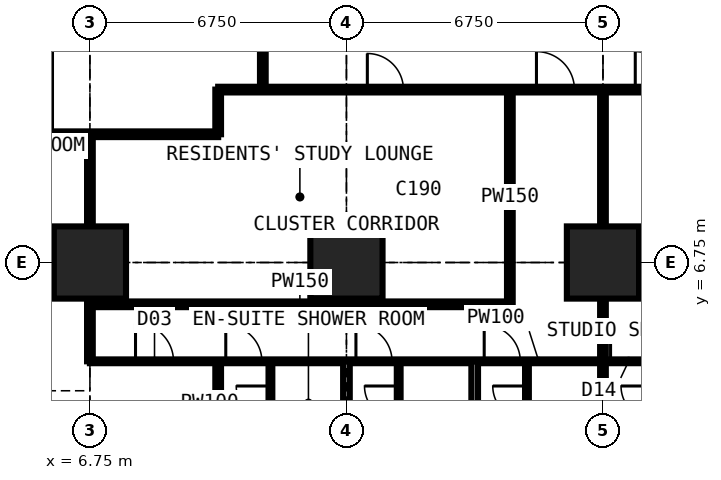
"""IFC4 building model, lengths in metres.
Left out: names, types, materials, properties, quantities, classifications, styles, units other than length and angle.
Written with IfcOpenShell. Run it as: python <this file> out.ifc"""

import sys

from ifc_helpers import new_model, si_unit, direction, frame, frame_2d, origin, origin_2d, place, context, subcontext, project, spatial, rectangle, extrude, element, fill, save


model = new_model("IFC4")
c1 = context("Model", 3, precision=1e-05, world=origin(), true_north=direction((0.0, 1.0)))
c2 = subcontext(c1, "Body", "Model", "MODEL_VIEW")
j1 = project(units=[si_unit("LENGTHUNIT", "METRE"), si_unit("PLANEANGLEUNIT", "RADIAN")], contexts=[c1])
p1 = place(None, origin())
s1 = spatial("IfcSite", under=j1, at=p1, CompositionType="ELEMENT")
p2 = place(p1, origin())
s2 = spatial("IfcBuilding", under=s1, at=p2, CompositionType="ELEMENT")
p3 = place(p2, frame((0.0, 0.0, 39.6)))
s3 = spatial("IfcBuildingStorey", under=s2, at=p3, CompositionType="ELEMENT", Elevation=39.6)
for number, where, z_axis, x_axis in (
    (1, (6.75, 6.75, 0.0), (0.0, 0.0, 1.0), (1.0, 0.0, 0.0)),
    (2, (13.5, 6.75, 0.0), (0.0, 0.0, 1.0), (1.0, 0.0, 0.0)),
    (3, (20.25, 6.75, 0.0), (0.0, 0.0, 1.0), (1.0, 0.0, 0.0)),
):
    element("IfcColumn", number, at=place(p3, frame(where, z_axis=z_axis, x_axis=x_axis)), inside=s3, PredefinedType="COLUMN", context=c2, shape_type="SweptSolid", body=[
        extrude(rectangle(XDim=1.9, YDim=1.9, at=origin_2d()), origin(), (0.0, 0.0, 1.0), 3.6),
    ])
p4 = place(p3, frame((-0.734, 10.125, 0.0), z_axis=(0.0, 0.0, 1.0), x_axis=(1.0, 0.0, 0.0)))
e4 = element("IfcWall", 4, at=p4, inside=s3, PredefinedType="PARTITIONING", context=c2, shape_type="SweptSolid", body=[
    extrude(rectangle(XDim=10.859, YDim=0.15, at=frame_2d((5.429, 0.0))), origin(), (0.0, 0.0, 1.0), 3.375),
])
p5 = place(p3, frame((6.75, 4.15, 0.0), z_axis=(0.0, 0.0, 1.0), x_axis=(0.0, 1.0, 0.0)))
e5 = element("IfcWall", 5, at=p5, inside=s3, PredefinedType="PARTITIONING", context=c2, shape_type="SweptSolid", body=[
    extrude(rectangle(XDim=5.975, YDim=0.15, at=frame_2d((2.988, 0.0))), origin(), (0.0, 0.0, 1.0), 2.877),
])
p6 = place(p3, frame((6.75, 4.15, 0.0), z_axis=(0.0, 0.0, 1.0), x_axis=(1.0, 0.0, 0.0)))
e6 = element("IfcWall", 6, at=p6, inside=s3, PredefinedType="PARTITIONING", context=c2, shape_type="SweptSolid", body=[
    extrude(rectangle(XDim=23.625, YDim=0.1, at=frame_2d((11.812, 0.0))), origin(), (0.0, 0.0, 1.0), 3.375),
])
p7 = place(p6, frame((1.2, 0.0, 0.0)))
e7 = element("IfcOpeningElement", 7, at=p7, cuts=e6, PredefinedType="OPENING", context=c2, shape_type="SweptSolid", body=[
    extrude(rectangle(XDim=1.0, YDim=2.2, at=frame_2d((0.5, 1.1))), frame((0.0, 0.06, 0.0), z_axis=(0.0, -1.0, 0.0), x_axis=(1.0, 0.0, 0.0)), (0.0, 0.0, 1.0), 0.12),
])
p8 = place(p6, frame((3.575, 0.0, 0.0)))
e8 = element("IfcOpeningElement", 8, at=p8, cuts=e6, PredefinedType="OPENING", context=c2, shape_type="SweptSolid", body=[
    extrude(rectangle(XDim=0.95, YDim=2.2, at=frame_2d((0.475, 1.1))), frame((0.0, 0.06, 0.0), z_axis=(0.0, -1.0, 0.0), x_axis=(1.0, 0.0, 0.0)), (0.0, 0.0, 1.0), 0.12),
])
p9 = place(p6, frame((7.0, 0.0, 0.0)))
e9 = element("IfcOpeningElement", 9, at=p9, cuts=e6, PredefinedType="OPENING", context=c2, shape_type="SweptSolid", body=[
    extrude(rectangle(XDim=0.95, YDim=2.2, at=frame_2d((0.475, 1.1))), frame((0.0, 0.06, 0.0), z_axis=(0.0, -1.0, 0.0), x_axis=(1.0, 0.0, 0.0)), (0.0, 0.0, 1.0), 0.12),
])
p10 = place(p6, frame((10.375, 0.0, 0.0)))
e10 = element("IfcOpeningElement", 10, at=p10, cuts=e6, PredefinedType="OPENING", context=c2, shape_type="SweptSolid", body=[
    extrude(rectangle(XDim=0.95, YDim=2.2, at=frame_2d((0.475, 1.1))), frame((0.0, 0.06, 0.0), z_axis=(0.0, -1.0, 0.0), x_axis=(1.0, 0.0, 0.0)), (0.0, 0.0, 1.0), 0.12),
])
p11 = place(p6, frame((13.7, 0.0, 0.0)))
e11 = element("IfcOpeningElement", 11, at=p11, cuts=e6, PredefinedType="OPENING", context=c2, shape_type="SweptSolid", body=[
    extrude(rectangle(XDim=0.95, YDim=2.2, at=frame_2d((0.475, 1.1))), frame((0.0, 0.06, 0.0), z_axis=(0.0, -1.0, 0.0), x_axis=(1.0, 0.0, 0.0)), (0.0, 0.0, 1.0), 0.12),
])
p12 = place(p6, frame((17.125, 0.0, 0.0)))
e12 = element("IfcOpeningElement", 12, at=p12, cuts=e6, PredefinedType="OPENING", context=c2, shape_type="SweptSolid", body=[
    extrude(rectangle(XDim=0.95, YDim=2.2, at=frame_2d((0.475, 1.1))), frame((0.0, 0.06, 0.0), z_axis=(0.0, -1.0, 0.0), x_axis=(1.0, 0.0, 0.0)), (0.0, 0.0, 1.0), 0.12),
])
p13 = place(p6, frame((20.5, 0.0, 0.0)))
e13 = element("IfcOpeningElement", 13, at=p13, cuts=e6, PredefinedType="OPENING", context=c2, shape_type="SweptSolid", body=[
    extrude(rectangle(XDim=0.95, YDim=2.2, at=frame_2d((0.475, 1.1))), frame((0.0, 0.06, 0.0), z_axis=(0.0, -1.0, 0.0), x_axis=(1.0, 0.0, 0.0)), (0.0, 0.0, 1.0), 0.12),
])
p14 = place(p3, frame((6.75, 5.65, 0.0), z_axis=(0.0, 0.0, 1.0), x_axis=(1.0, 0.0, 0.0)))
e14 = element("IfcWall", 14, at=p14, inside=s3, PredefinedType="PARTITIONING", context=c2, shape_type="SweptSolid", body=[
    extrude(rectangle(XDim=11.05, YDim=0.15, at=frame_2d((5.525, 0.0))), origin(), (0.0, 0.0, 1.0), 3.375),
])
p15 = place(p3, frame((10.125, -0.734, 0.0), z_axis=(0.0, 0.0, 1.0), x_axis=(0.0, 1.0, 0.0)))
e15 = element("IfcWall", 15, at=p15, inside=s3, PredefinedType="PARTITIONING", context=c2, shape_type="SweptSolid", body=[
    extrude(rectangle(XDim=4.884, YDim=0.15, at=frame_2d((2.442, 0.0))), origin(), (0.0, 0.0, 1.0), 3.375),
])
p16 = place(p3, frame((10.125, 10.125, 0.0), z_axis=(0.0, 0.0, 1.0), x_axis=(0.0, 1.0, 0.0)))
e16 = element("IfcWall", 16, at=p16, inside=s3, PredefinedType="PARTITIONING", context=c2, shape_type="SweptSolid", body=[
    extrude(rectangle(XDim=1.175, YDim=0.15, at=frame_2d((0.587, 0.0))), origin(), (0.0, 0.0, 1.0), 3.375),
])
p17 = place(p3, frame((10.125, 11.3, 0.0), z_axis=(0.0, 0.0, 1.0), x_axis=(1.0, 0.0, 0.0)))
e17 = element("IfcWall", 17, at=p17, inside=s3, PredefinedType="PARTITIONING", context=c2, shape_type="SweptSolid", body=[
    extrude(rectangle(XDim=20.675, YDim=0.15, at=frame_2d((10.337, 0.0))), origin(), (0.0, 0.0, 1.0), 3.375),
])
p18 = place(p17, frame((8.375, 0.0, 0.0)))
e18 = element("IfcOpeningElement", 18, at=p18, cuts=e17, PredefinedType="OPENING", context=c2, shape_type="SweptSolid", body=[
    extrude(rectangle(XDim=1.0, YDim=2.2, at=frame_2d((0.5, 1.1))), frame((0.0, 0.085, 0.0), z_axis=(0.0, -1.0, 0.0), x_axis=(1.0, 0.0, 0.0)), (0.0, 0.0, 1.0), 0.17),
])
p19 = place(p17, frame((10.975, 0.0, 0.0)))
e19 = element("IfcOpeningElement", 19, at=p19, cuts=e17, PredefinedType="OPENING", context=c2, shape_type="SweptSolid", body=[
    extrude(rectangle(XDim=1.0, YDim=2.2, at=frame_2d((0.5, 1.1))), frame((0.0, 0.085, 0.0), z_axis=(0.0, -1.0, 0.0), x_axis=(1.0, 0.0, 0.0)), (0.0, 0.0, 1.0), 0.17),
])
p20 = place(p17, frame((3.925, 0.0, 0.0)))
e20 = element("IfcOpeningElement", 20, at=p20, cuts=e17, PredefinedType="OPENING", context=c2, shape_type="SweptSolid", body=[
    extrude(rectangle(XDim=0.95, YDim=2.2, at=frame_2d((0.475, 1.1))), frame((0.0, 0.085, 0.0), z_axis=(0.0, -1.0, 0.0), x_axis=(1.0, 0.0, 0.0)), (0.0, 0.0, 1.0), 0.17),
])
p21 = place(p3, frame((11.3, 11.3, 0.0), z_axis=(0.0, 0.0, 1.0), x_axis=(0.0, 1.0, 0.0)))
e21 = element("IfcWall", 21, at=p21, inside=s3, PredefinedType="PARTITIONING", context=c2, shape_type="SweptSolid", body=[
    extrude(rectangle(XDim=19.075, YDim=0.15, at=frame_2d((9.538, 0.0))), origin(), (0.0, 0.0, 1.0), 3.375),
])
p22 = place(p21, frame((10.137, 0.0, 0.0)))
e22 = element("IfcOpeningElement", 22, at=p22, cuts=e21, PredefinedType="OPENING", context=c2, shape_type="SweptSolid", body=[
    extrude(rectangle(XDim=1.0, YDim=2.2, at=frame_2d((0.5, 1.1))), frame((0.0, 0.085, 0.0), z_axis=(0.0, -1.0, 0.0), x_axis=(1.0, 0.0, 0.0)), (0.0, 0.0, 1.0), 0.17),
])
p23 = place(p3, frame((11.5, 1.95, 0.0), z_axis=(0.0, 0.0, 1.0), x_axis=(0.0, 1.0, 0.0)))
e23 = element("IfcWall", 23, at=p23, inside=s3, PredefinedType="PARTITIONING", context=c2, shape_type="SweptSolid", body=[
    extrude(rectangle(XDim=2.2, YDim=0.1, at=frame_2d((1.1, 0.0))), origin(), (0.0, 0.0, 1.0), 3.375),
])
p24 = place(p23, frame((0.65, 0.0, 0.0)))
e24 = element("IfcOpeningElement", 24, at=p24, cuts=e23, PredefinedType="OPENING", context=c2, shape_type="SweptSolid", body=[
    extrude(rectangle(XDim=0.9, YDim=2.2, at=frame_2d((0.45, 1.1))), frame((0.0, 0.06, 0.0), z_axis=(0.0, -1.0, 0.0), x_axis=(1.0, 0.0, 0.0)), (0.0, 0.0, 1.0), 0.12),
])
p25 = place(p3, frame((13.5, -0.734, 0.0), z_axis=(0.0, 0.0, 1.0), x_axis=(0.0, 1.0, 0.0)))
e25 = element("IfcWall", 25, at=p25, inside=s3, PredefinedType="PARTITIONING", context=c2, shape_type="SweptSolid", body=[
    extrude(rectangle(XDim=4.884, YDim=0.175, at=frame_2d((2.442, 0.0))), origin(), (0.0, 0.0, 1.0), 2.877),
])
p26 = place(p3, frame((14.875, 1.95, 0.0), z_axis=(0.0, 0.0, 1.0), x_axis=(0.0, 1.0, 0.0)))
e26 = element("IfcWall", 26, at=p26, inside=s3, PredefinedType="PARTITIONING", context=c2, shape_type="SweptSolid", body=[
    extrude(rectangle(XDim=2.2, YDim=0.1, at=frame_2d((1.1, 0.0))), origin(), (0.0, 0.0, 1.0), 3.375),
])
p27 = place(p26, frame((0.65, 0.0, 0.0)))
e27 = element("IfcOpeningElement", 27, at=p27, cuts=e26, PredefinedType="OPENING", context=c2, shape_type="SweptSolid", body=[
    extrude(rectangle(XDim=0.9, YDim=2.2, at=frame_2d((0.45, 1.1))), frame((0.0, 0.06, 0.0), z_axis=(0.0, -1.0, 0.0), x_axis=(1.0, 0.0, 0.0)), (0.0, 0.0, 1.0), 0.12),
])
p28 = place(p3, frame((16.875, -0.734, 0.0), z_axis=(0.0, 0.0, 1.0), x_axis=(0.0, 1.0, 0.0)))
e28 = element("IfcWall", 28, at=p28, inside=s3, PredefinedType="PARTITIONING", context=c2, shape_type="SweptSolid", body=[
    extrude(rectangle(XDim=4.884, YDim=0.175, at=frame_2d((2.442, 0.0))), origin(), (0.0, 0.0, 1.0), 3.375),
])
p29 = place(p3, frame((17.8, 5.65, 0.0), z_axis=(0.0, 0.0, 1.0), x_axis=(0.0, 1.0, 0.0)))
e29 = element("IfcWall", 29, at=p29, inside=s3, PredefinedType="PARTITIONING", context=c2, shape_type="SweptSolid", body=[
    extrude(rectangle(XDim=5.65, YDim=0.15, at=frame_2d((2.825, 0.0))), origin(), (0.0, 0.0, 1.0), 3.375),
])
p30 = place(p3, frame((18.25, 1.95, 0.0), z_axis=(0.0, 0.0, 1.0), x_axis=(0.0, 1.0, 0.0)))
e30 = element("IfcWall", 30, at=p30, inside=s3, PredefinedType="PARTITIONING", context=c2, shape_type="SweptSolid", body=[
    extrude(rectangle(XDim=2.2, YDim=0.1, at=frame_2d((1.1, 0.0))), origin(), (0.0, 0.0, 1.0), 3.375),
])
p31 = place(p30, frame((0.65, 0.0, 0.0)))
e31 = element("IfcOpeningElement", 31, at=p31, cuts=e30, PredefinedType="OPENING", context=c2, shape_type="SweptSolid", body=[
    extrude(rectangle(XDim=0.9, YDim=2.2, at=frame_2d((0.45, 1.1))), frame((0.0, 0.06, 0.0), z_axis=(0.0, -1.0, 0.0), x_axis=(1.0, 0.0, 0.0)), (0.0, 0.0, 1.0), 0.12),
])
p32 = place(p3, frame((20.25, -0.734, 0.0), z_axis=(0.0, 0.0, 1.0), x_axis=(0.0, 1.0, 0.0)))
e32 = element("IfcWall", 32, at=p32, inside=s3, PredefinedType="PARTITIONING", context=c2, shape_type="SweptSolid", body=[
    extrude(rectangle(XDim=12.034, YDim=0.15, at=frame_2d((6.017, 0.0))), origin(), (0.0, 0.0, 1.0), 2.61),
])
p33 = place(p7, origin())
e33 = element("IfcDoor", 33, at=p33, inside=s3, OperationType="SINGLE_SWING_LEFT", PredefinedType="DOOR", context=c2, shape_type="SweptSolid", body=[
    extrude(rectangle(XDim=1.0, YDim=2.2, at=frame_2d((0.5, 1.1))), frame((0.0, 0.025, 0.0), z_axis=(0.0, -1.0, 0.0), x_axis=(1.0, 0.0, 0.0)), (0.0, 0.0, 1.0), 0.05),
])
fill(e7, e33)
p34 = place(p8, origin())
e34 = element("IfcDoor", 34, at=p34, inside=s3, OperationType="SINGLE_SWING_LEFT", PredefinedType="DOOR", context=c2, shape_type="SweptSolid", body=[
    extrude(rectangle(XDim=0.95, YDim=2.2, at=frame_2d((0.475, 1.1))), frame((0.0, 0.025, 0.0), z_axis=(0.0, -1.0, 0.0), x_axis=(1.0, 0.0, 0.0)), (0.0, 0.0, 1.0), 0.05),
])
fill(e8, e34)
p35 = place(p24, origin())
e35 = element("IfcDoor", 35, at=p35, inside=s3, OperationType="SINGLE_SWING_RIGHT", PredefinedType="DOOR", context=c2, shape_type="SweptSolid", body=[
    extrude(rectangle(XDim=0.9, YDim=2.2, at=frame_2d((0.45, 1.1))), frame((0.0, 0.025, 0.0), z_axis=(0.0, -1.0, 0.0), x_axis=(1.0, 0.0, 0.0)), (0.0, 0.0, 1.0), 0.05),
])
fill(e24, e35)
p36 = place(p9, origin())
e36 = element("IfcDoor", 36, at=p36, inside=s3, OperationType="SINGLE_SWING_LEFT", PredefinedType="DOOR", context=c2, shape_type="SweptSolid", body=[
    extrude(rectangle(XDim=0.95, YDim=2.2, at=frame_2d((0.475, 1.1))), frame((0.0, 0.025, 0.0), z_axis=(0.0, -1.0, 0.0), x_axis=(1.0, 0.0, 0.0)), (0.0, 0.0, 1.0), 0.05),
])
fill(e9, e36)
p37 = place(p27, origin())
e37 = element("IfcDoor", 37, at=p37, inside=s3, OperationType="SINGLE_SWING_RIGHT", PredefinedType="DOOR", context=c2, shape_type="SweptSolid", body=[
    extrude(rectangle(XDim=0.9, YDim=2.2, at=frame_2d((0.45, 1.1))), frame((0.0, 0.025, 0.0), z_axis=(0.0, -1.0, 0.0), x_axis=(1.0, 0.0, 0.0)), (0.0, 0.0, 1.0), 0.05),
])
fill(e27, e37)
p38 = place(p10, origin())
e38 = element("IfcDoor", 38, at=p38, inside=s3, OperationType="SINGLE_SWING_LEFT", PredefinedType="DOOR", context=c2, shape_type="SweptSolid", body=[
    extrude(rectangle(XDim=0.95, YDim=2.2, at=frame_2d((0.475, 1.1))), frame((0.0, 0.025, 0.0), z_axis=(0.0, -1.0, 0.0), x_axis=(1.0, 0.0, 0.0)), (0.0, 0.0, 1.0), 0.05),
])
fill(e10, e38)
p39 = place(p31, origin())
e39 = element("IfcDoor", 39, at=p39, inside=s3, OperationType="SINGLE_SWING_RIGHT", PredefinedType="DOOR", context=c2, shape_type="SweptSolid", body=[
    extrude(rectangle(XDim=0.9, YDim=2.2, at=frame_2d((0.45, 1.1))), frame((0.0, 0.025, 0.0), z_axis=(0.0, -1.0, 0.0), x_axis=(1.0, 0.0, 0.0)), (0.0, 0.0, 1.0), 0.05),
])
fill(e31, e39)
p40 = place(p18, origin())
e40 = element("IfcDoor", 40, at=p40, inside=s3, OperationType="SINGLE_SWING_LEFT", PredefinedType="DOOR", context=c2, shape_type="SweptSolid", body=[
    extrude(rectangle(XDim=1.0, YDim=2.2, at=frame_2d((0.5, 1.1))), frame((0.0, 0.025, 0.0), z_axis=(0.0, -1.0, 0.0), x_axis=(1.0, 0.0, 0.0)), (0.0, 0.0, 1.0), 0.05),
])
fill(e18, e40)
p41 = place(p11, origin())
e41 = element("IfcDoor", 41, at=p41, inside=s3, OperationType="SINGLE_SWING_LEFT", PredefinedType="DOOR", context=c2, shape_type="SweptSolid", body=[
    extrude(rectangle(XDim=0.95, YDim=2.2, at=frame_2d((0.475, 1.1))), frame((0.0, 0.025, 0.0), z_axis=(0.0, -1.0, 0.0), x_axis=(1.0, 0.0, 0.0)), (0.0, 0.0, 1.0), 0.05),
])
fill(e11, e41)
p42 = place(p19, origin())
e42 = element("IfcDoor", 42, at=p42, inside=s3, OperationType="SINGLE_SWING_LEFT", PredefinedType="DOOR", context=c2, shape_type="SweptSolid", body=[
    extrude(rectangle(XDim=1.0, YDim=2.2, at=frame_2d((0.5, 1.1))), frame((0.0, 0.025, 0.0), z_axis=(0.0, -1.0, 0.0), x_axis=(1.0, 0.0, 0.0)), (0.0, 0.0, 1.0), 0.05),
])
fill(e19, e42)
p43 = place(p20, origin())
e43 = element("IfcDoor", 43, at=p43, inside=s3, OperationType="SINGLE_SWING_LEFT", PredefinedType="DOOR", context=c2, shape_type="SweptSolid", body=[
    extrude(rectangle(XDim=0.95, YDim=2.2, at=frame_2d((0.475, 1.1))), frame((0.0, 0.025, 0.0), z_axis=(0.0, -1.0, 0.0), x_axis=(1.0, 0.0, 0.0)), (0.0, 0.0, 1.0), 0.05),
])
fill(e20, e43)
save(model, sys.argv[1])
